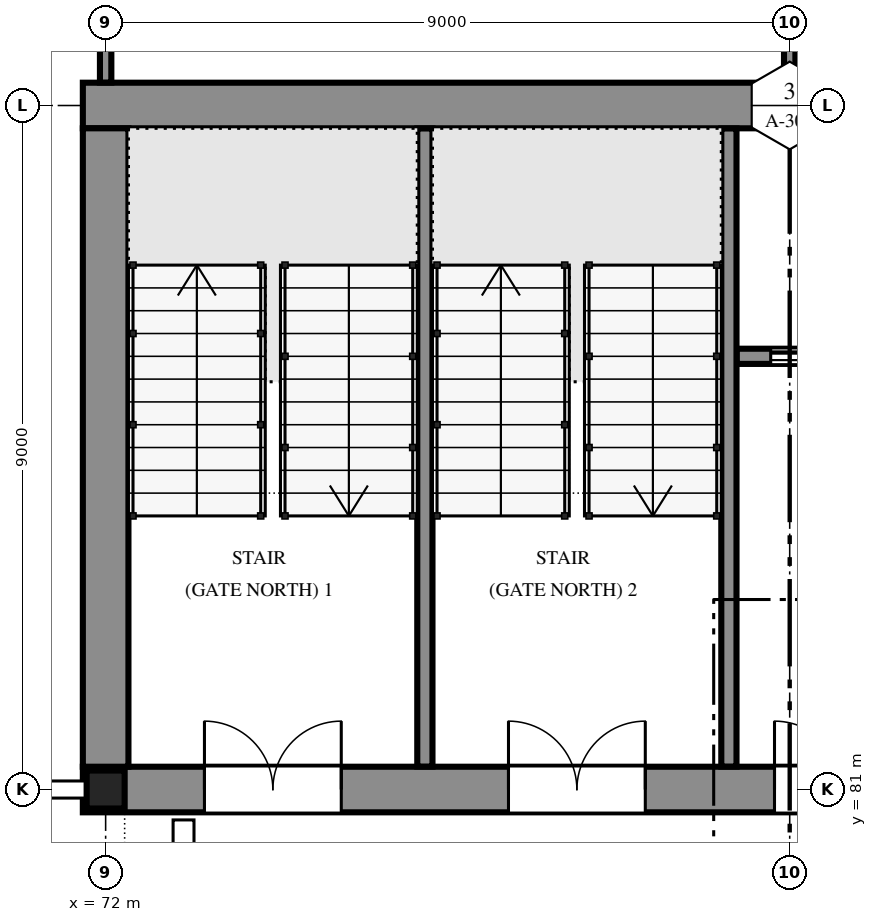
"""IFC4 building model, lengths in metres.
Left out: names, types, materials, properties, quantities, classifications, styles, units other than length and angle.
Written with IfcOpenShell. Run it as: python <this file> out.ifc"""

import sys

from ifc_helpers import new_model, si_unit, direction, frame, frame_2d, origin, origin_2d, place, context, subcontext, project, spatial, polyline, rectangle, hollow_rectangle, outline, extrude, element, fill, save


model = new_model("IFC4")
c1 = context("Model", 3, precision=1e-05, world=origin(), true_north=direction((0.0, 1.0)))
c2 = subcontext(c1, "Body", "Model", "MODEL_VIEW")
j1 = project(units=[si_unit("LENGTHUNIT", "METRE"), si_unit("PLANEANGLEUNIT", "RADIAN")], contexts=[c1])
p1 = place(None, origin())
s1 = spatial("IfcSite", under=j1, at=p1, CompositionType="ELEMENT")
p2 = place(p1, origin())
s2 = spatial("IfcBuilding", under=s1, at=p2, CompositionType="ELEMENT")
p3 = place(p2, frame((0.0, 0.0, 7.5)))
s3 = spatial("IfcBuildingStorey", under=s2, at=p3, CompositionType="ELEMENT", Elevation=7.5)
p4 = place(p3, frame((72.0, 81.0, 0.0), z_axis=(0.0, 0.0, 1.0), x_axis=(1.0, 0.0, 0.0)))
e1 = element("IfcColumn", 1, at=p4, inside=s3, PredefinedType="COLUMN", context=c2, shape_type="SweptSolid", body=[
    extrude(hollow_rectangle(XDim=0.5, YDim=0.5, WallThickness=0.032, at=origin_2d()), origin(), (0.0, 0.0, 1.0), 4.2),
])
p5 = place(p3, frame((71.7, 81.0, 0.0), z_axis=(0.0, 0.0, 1.0), x_axis=(1.0, 0.0, 0.0)))
e2 = element("IfcWall", 2, at=p5, inside=s3, PredefinedType="SOLIDWALL", context=c2, shape_type="SweptSolid", body=[
    extrude(rectangle(XDim=18.6, YDim=0.6, at=frame_2d((9.3, 0.0))), origin(), (0.0, 0.0, 1.0), 4.2),
])
p6 = place(p5, frame((1.6, 0.0, 0.0)))
e3 = element("IfcOpeningElement", 3, at=p6, cuts=e2, PredefinedType="OPENING", context=c2, shape_type="SweptSolid", body=[
    extrude(rectangle(XDim=1.8, YDim=2.1, at=frame_2d((0.9, 1.05))), frame((0.0, 0.31, 0.0), z_axis=(0.0, -1.0, 0.0), x_axis=(1.0, 0.0, 0.0)), (0.0, 0.0, 1.0), 0.62),
])
p7 = place(p5, frame((5.6, 0.0, 0.0)))
e4 = element("IfcOpeningElement", 4, at=p7, cuts=e2, PredefinedType="OPENING", context=c2, shape_type="SweptSolid", body=[
    extrude(rectangle(XDim=1.8, YDim=2.1, at=frame_2d((0.9, 1.05))), frame((0.0, 0.31, 0.0), z_axis=(0.0, -1.0, 0.0), x_axis=(1.0, 0.0, 0.0)), (0.0, 0.0, 1.0), 0.62),
])
p8 = place(p5, frame((9.1, 0.0, 0.0)))
e5 = element("IfcOpeningElement", 5, at=p8, cuts=e2, PredefinedType="OPENING", context=c2, shape_type="SweptSolid", body=[
    extrude(rectangle(XDim=1.8, YDim=2.1, at=frame_2d((0.9, 1.05))), frame((0.0, 0.31, 0.0), z_axis=(0.0, -1.0, 0.0), x_axis=(1.0, 0.0, 0.0)), (0.0, 0.0, 1.0), 0.62),
])
p9 = place(p3, frame((71.7, 90.0, 0.0), z_axis=(0.0, 0.0, 1.0), x_axis=(1.0, 0.0, 0.0)))
e6 = element("IfcWall", 6, at=p9, inside=s3, PredefinedType="SOLIDWALL", context=c2, shape_type="SweptSolid", body=[
    extrude(rectangle(XDim=18.6, YDim=0.6, at=frame_2d((9.3, 0.0))), origin(), (0.0, 0.0, 1.0), 4.2),
])
p10 = place(p3, frame((72.0, 81.3, 0.0), z_axis=(0.0, 0.0, 1.0), x_axis=(0.0, 1.0, 0.0)))
e7 = element("IfcWall", 7, at=p10, inside=s3, PredefinedType="SOLIDWALL", context=c2, shape_type="SweptSolid", body=[
    extrude(rectangle(XDim=8.4, YDim=0.6, at=frame_2d((4.2, 0.0))), origin(), (0.0, 0.0, 1.0), 4.2),
])
for number, where, z_axis, x_axis in (
    (8, (76.2, 81.302, -0.13), (0.0, 0.0, 1.0), (0.0, 1.0, 0.0)),
    (9, (80.2, 81.302, -0.13), (0.0, 0.0, 1.0), (0.0, 1.0, 0.0)),
):
    element("IfcWall", number, at=place(p3, frame(where, z_axis=z_axis, x_axis=x_axis)), inside=s3, PredefinedType="SOLIDWALL", context=c2, shape_type="SweptSolid", body=[
        extrude(rectangle(XDim=8.396, YDim=0.2, at=frame_2d((4.198, 0.0))), origin(), (0.0, 0.0, 1.0), 3.646),
    ])
p11 = place(p3, frame((80.302, 86.7, 0.0), z_axis=(0.0, 0.0, 1.0), x_axis=(1.0, 0.0, 0.0)))
e10 = element("IfcWall", 10, at=p11, inside=s3, PredefinedType="SOLIDWALL", context=c2, shape_type="SweptSolid", body=[
    extrude(rectangle(XDim=2.198, YDim=0.2, at=frame_2d((1.099, 0.0))), origin(), (0.0, 0.0, 1.0), 3.516),
])
p12 = place(p11, frame((0.448, 0.0, 0.0)))
e11 = element("IfcOpeningElement", 11, at=p12, cuts=e10, PredefinedType="OPENING", context=c2, shape_type="SweptSolid", body=[
    extrude(rectangle(XDim=1.1, YDim=2.1, at=frame_2d((0.55, 1.05))), frame((0.0, 0.11, 0.0), z_axis=(0.0, -1.0, 0.0), x_axis=(1.0, 0.0, 0.0)), (0.0, 0.0, 1.0), 0.22),
])
for number, where, z_axis, x_axis in (
    (12, (72.0, 95.938, 0.0), (0.0, 0.0, 1.0), (0.0, -1.0, 0.0)),
    (13, (81.0, 95.938, 0.0), (0.0, 0.0, 1.0), (0.0, -1.0, 0.0)),
):
    element("IfcWall", number, at=place(p3, frame(where, z_axis=z_axis, x_axis=x_axis)), inside=s3, PredefinedType="PARTITIONING", context=c2, shape_type="SweptSolid", body=[
        extrude(rectangle(XDim=5.635, YDim=0.15, at=frame_2d((2.818, 0.0))), origin(), (0.0, 0.0, 1.0), 3.307),
    ])
p13 = place(p12, origin())
e14 = element("IfcDoor", 14, at=p13, inside=s3, OperationType="SLIDING_TO_LEFT", PredefinedType="DOOR", context=c2, shape_type="SweptSolid", body=[
    extrude(outline(polyline([(0.0, 0.0), (0.07, 0.0), (0.07, 2.03), (1.03, 2.03), (1.03, 0.0), (1.1, 0.0), (1.1, 2.1), (0.0, 2.1), (0.0, 0.0)])), frame((0.0, 0.025, 0.0), z_axis=(0.0, -1.0, 0.0), x_axis=(1.0, 0.0, 0.0)), (0.0, 0.0, 1.0), 0.05),
    extrude(rectangle(XDim=0.524, YDim=2.016, at=frame_2d((0.336, 1.018))), frame((0.0, 0.018, 0.0), z_axis=(0.0, -1.0, 0.0), x_axis=(1.0, 0.0, 0.0)), (0.0, 0.0, 1.0), 0.016),
    extrude(rectangle(XDim=0.52, YDim=2.016, at=frame_2d((0.766, 1.018))), frame((0.0, -0.002, 0.0), z_axis=(0.0, -1.0, 0.0), x_axis=(1.0, 0.0, 0.0)), (0.0, 0.0, 1.0), 0.016),
])
fill(e11, e14)
p14 = place(p6, origin())
e15 = element("IfcDoor", 15, at=p14, inside=s3, OperationType="DOUBLE_DOOR_SINGLE_SWING", PredefinedType="DOOR", context=c2, shape_type="SweptSolid", body=[
    extrude(outline(polyline([(0.0, 0.0), (0.07, 0.0), (0.07, 2.03), (1.73, 2.03), (1.73, 0.0), (1.8, 0.0), (1.8, 2.1), (0.0, 2.1), (0.0, 0.0)])), frame((0.0, 0.025, 0.0), z_axis=(0.0, -1.0, 0.0), x_axis=(1.0, 0.0, 0.0)), (0.0, 0.0, 1.0), 0.05),
    extrude(outline(polyline([(0.074, 0.01), (0.897, 0.01), (0.897, 2.026), (0.074, 2.026), (0.074, 0.01)]), holes=[polyline([(0.194, 0.16), (0.777, 0.16), (0.777, 1.01), (0.194, 1.01), (0.194, 0.16)]), polyline([(0.335, 1.16), (0.635, 1.16), (0.635, 1.76), (0.335, 1.76), (0.335, 1.16)])]), frame((0.0, 0.017, 0.0), z_axis=(0.0, -1.0, 0.0), x_axis=(1.0, 0.0, 0.0)), (0.0, 0.0, 1.0), 0.035),
    extrude(rectangle(XDim=0.583, YDim=0.85, at=frame_2d((0.485, 0.585))), frame((0.0, 0.009, 0.0), z_axis=(0.0, -1.0, 0.0), x_axis=(1.0, 0.0, 0.0)), (0.0, 0.0, 1.0), 0.017),
    extrude(rectangle(XDim=0.3, YDim=0.6, at=frame_2d((0.485, 1.46))), frame((0.0, 0.006, 0.0), z_axis=(0.0, -1.0, 0.0), x_axis=(1.0, 0.0, 0.0)), (0.0, 0.0, 1.0), 0.012),
    extrude(outline(polyline([(0.903, 0.01), (1.726, 0.01), (1.726, 2.026), (0.903, 2.026), (0.903, 0.01)]), holes=[polyline([(1.023, 0.16), (1.606, 0.16), (1.606, 1.01), (1.023, 1.01), (1.023, 0.16)]), polyline([(1.165, 1.16), (1.465, 1.16), (1.465, 1.76), (1.165, 1.76), (1.165, 1.16)])]), frame((0.0, 0.017, 0.0), z_axis=(0.0, -1.0, 0.0), x_axis=(1.0, 0.0, 0.0)), (0.0, 0.0, 1.0), 0.035),
    extrude(rectangle(XDim=0.583, YDim=0.85, at=frame_2d((1.314, 0.585))), frame((0.0, 0.009, 0.0), z_axis=(0.0, -1.0, 0.0), x_axis=(1.0, 0.0, 0.0)), (0.0, 0.0, 1.0), 0.017),
    extrude(rectangle(XDim=0.3, YDim=0.6, at=frame_2d((1.314, 1.46))), frame((0.0, 0.006, 0.0), z_axis=(0.0, -1.0, 0.0), x_axis=(1.0, 0.0, 0.0)), (0.0, 0.0, 1.0), 0.012),
])
fill(e3, e15)
p15 = place(p7, origin())
e16 = element("IfcDoor", 16, at=p15, inside=s3, OperationType="DOUBLE_DOOR_SINGLE_SWING", PredefinedType="DOOR", context=c2, shape_type="SweptSolid", body=[
    extrude(outline(polyline([(0.0, 0.0), (0.07, 0.0), (0.07, 2.03), (1.73, 2.03), (1.73, 0.0), (1.8, 0.0), (1.8, 2.1), (0.0, 2.1), (0.0, 0.0)])), frame((0.0, 0.025, 0.0), z_axis=(0.0, -1.0, 0.0), x_axis=(1.0, 0.0, 0.0)), (0.0, 0.0, 1.0), 0.05),
    extrude(outline(polyline([(0.074, 0.01), (0.897, 0.01), (0.897, 2.026), (0.074, 2.026), (0.074, 0.01)]), holes=[polyline([(0.194, 0.16), (0.777, 0.16), (0.777, 1.01), (0.194, 1.01), (0.194, 0.16)]), polyline([(0.335, 1.16), (0.635, 1.16), (0.635, 1.76), (0.335, 1.76), (0.335, 1.16)])]), frame((0.0, 0.017, 0.0), z_axis=(0.0, -1.0, 0.0), x_axis=(1.0, 0.0, 0.0)), (0.0, 0.0, 1.0), 0.035),
    extrude(rectangle(XDim=0.583, YDim=0.85, at=frame_2d((0.485, 0.585))), frame((0.0, 0.009, 0.0), z_axis=(0.0, -1.0, 0.0), x_axis=(1.0, 0.0, 0.0)), (0.0, 0.0, 1.0), 0.017),
    extrude(rectangle(XDim=0.3, YDim=0.6, at=frame_2d((0.485, 1.46))), frame((0.0, 0.006, 0.0), z_axis=(0.0, -1.0, 0.0), x_axis=(1.0, 0.0, 0.0)), (0.0, 0.0, 1.0), 0.012),
    extrude(outline(polyline([(0.903, 0.01), (1.726, 0.01), (1.726, 2.026), (0.903, 2.026), (0.903, 0.01)]), holes=[polyline([(1.023, 0.16), (1.606, 0.16), (1.606, 1.01), (1.023, 1.01), (1.023, 0.16)]), polyline([(1.165, 1.16), (1.465, 1.16), (1.465, 1.76), (1.165, 1.76), (1.165, 1.16)])]), frame((0.0, 0.017, 0.0), z_axis=(0.0, -1.0, 0.0), x_axis=(1.0, 0.0, 0.0)), (0.0, 0.0, 1.0), 0.035),
    extrude(rectangle(XDim=0.583, YDim=0.85, at=frame_2d((1.314, 0.585))), frame((0.0, 0.009, 0.0), z_axis=(0.0, -1.0, 0.0), x_axis=(1.0, 0.0, 0.0)), (0.0, 0.0, 1.0), 0.017),
    extrude(rectangle(XDim=0.3, YDim=0.6, at=frame_2d((1.314, 1.46))), frame((0.0, 0.006, 0.0), z_axis=(0.0, -1.0, 0.0), x_axis=(1.0, 0.0, 0.0)), (0.0, 0.0, 1.0), 0.012),
])
fill(e4, e16)
p16 = place(p8, origin())
e17 = element("IfcDoor", 17, at=p16, inside=s3, OperationType="DOUBLE_DOOR_SINGLE_SWING", PredefinedType="DOOR", context=c2, shape_type="SweptSolid", body=[
    extrude(outline(polyline([(0.0, 0.0), (0.07, 0.0), (0.07, 2.03), (1.73, 2.03), (1.73, 0.0), (1.8, 0.0), (1.8, 2.1), (0.0, 2.1), (0.0, 0.0)])), frame((0.0, 0.025, 0.0), z_axis=(0.0, -1.0, 0.0), x_axis=(1.0, 0.0, 0.0)), (0.0, 0.0, 1.0), 0.05),
    extrude(outline(polyline([(0.074, 0.01), (0.897, 0.01), (0.897, 2.026), (0.074, 2.026), (0.074, 0.01)]), holes=[polyline([(0.194, 0.16), (0.777, 0.16), (0.777, 1.01), (0.194, 1.01), (0.194, 0.16)]), polyline([(0.335, 1.16), (0.635, 1.16), (0.635, 1.76), (0.335, 1.76), (0.335, 1.16)])]), frame((0.0, 0.017, 0.0), z_axis=(0.0, -1.0, 0.0), x_axis=(1.0, 0.0, 0.0)), (0.0, 0.0, 1.0), 0.035),
    extrude(rectangle(XDim=0.583, YDim=0.85, at=frame_2d((0.485, 0.585))), frame((0.0, 0.009, 0.0), z_axis=(0.0, -1.0, 0.0), x_axis=(1.0, 0.0, 0.0)), (0.0, 0.0, 1.0), 0.017),
    extrude(rectangle(XDim=0.3, YDim=0.6, at=frame_2d((0.485, 1.46))), frame((0.0, 0.006, 0.0), z_axis=(0.0, -1.0, 0.0), x_axis=(1.0, 0.0, 0.0)), (0.0, 0.0, 1.0), 0.012),
    extrude(outline(polyline([(0.903, 0.01), (1.726, 0.01), (1.726, 2.026), (0.903, 2.026), (0.903, 0.01)]), holes=[polyline([(1.023, 0.16), (1.606, 0.16), (1.606, 1.01), (1.023, 1.01), (1.023, 0.16)]), polyline([(1.165, 1.16), (1.465, 1.16), (1.465, 1.76), (1.165, 1.76), (1.165, 1.16)])]), frame((0.0, 0.017, 0.0), z_axis=(0.0, -1.0, 0.0), x_axis=(1.0, 0.0, 0.0)), (0.0, 0.0, 1.0), 0.035),
    extrude(rectangle(XDim=0.583, YDim=0.85, at=frame_2d((1.314, 0.585))), frame((0.0, 0.009, 0.0), z_axis=(0.0, -1.0, 0.0), x_axis=(1.0, 0.0, 0.0)), (0.0, 0.0, 1.0), 0.017),
    extrude(rectangle(XDim=0.3, YDim=0.6, at=frame_2d((1.314, 1.46))), frame((0.0, 0.006, 0.0), z_axis=(0.0, -1.0, 0.0), x_axis=(1.0, 0.0, 0.0)), (0.0, 0.0, 1.0), 0.012),
])
fill(e5, e17)
save(model, sys.argv[1])
